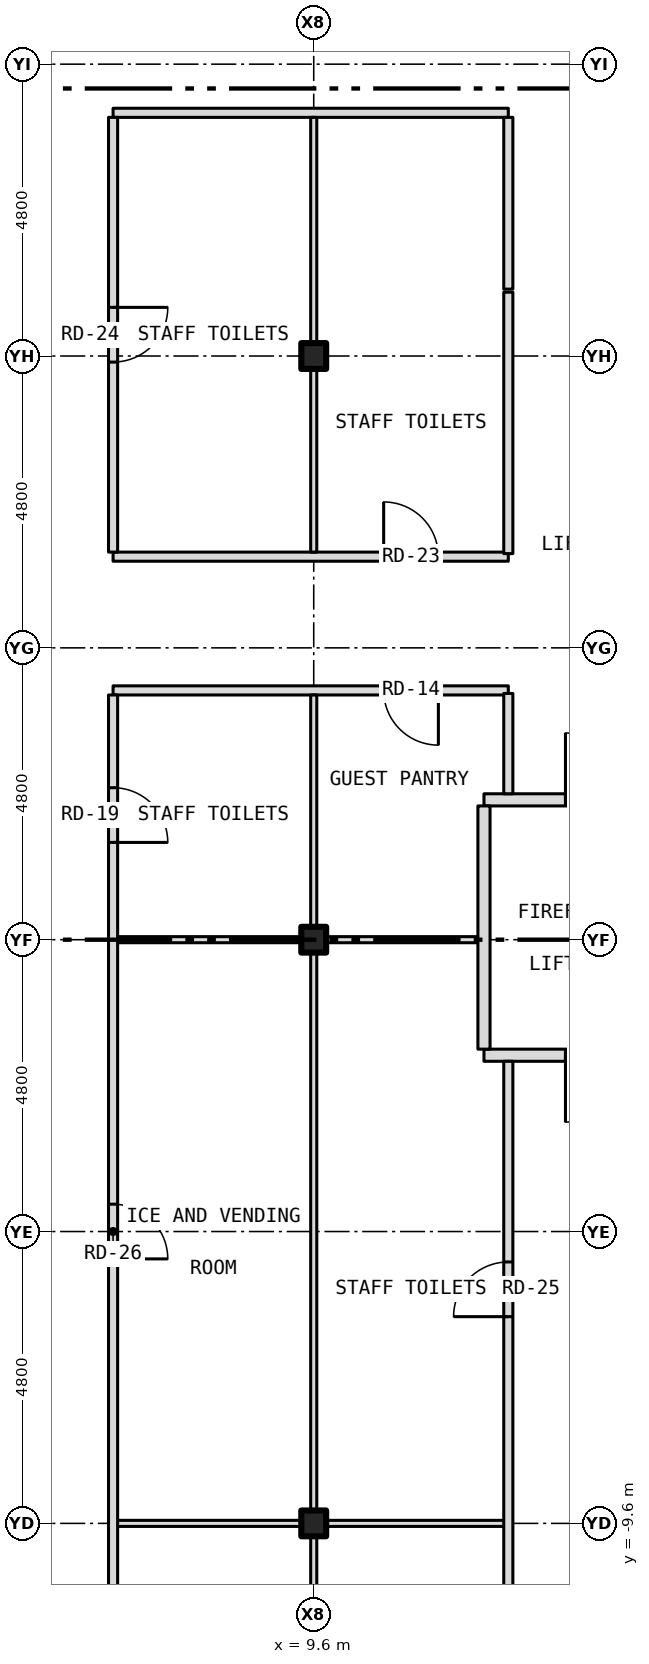
"""IFC4 building model, lengths in metres.
Left out: names, types, materials, properties, quantities, classifications, styles, units other than length and angle.
Written with IfcOpenShell. Run it as: python <this file> out.ifc"""

import sys

from ifc_helpers import new_model, si_unit, direction, frame, frame_2d, origin, origin_2d, place, context, subcontext, project, spatial, rectangle, i_section, extrude, element, fill, save


model = new_model("IFC4")
c1 = context("Model", 3, precision=1e-05, world=origin(), true_north=direction((0.0, 1.0)))
c2 = subcontext(c1, "Body", "Model", "MODEL_VIEW")
j1 = project(units=[si_unit("LENGTHUNIT", "METRE"), si_unit("PLANEANGLEUNIT", "RADIAN")], contexts=[c1])
p1 = place(None, origin())
s1 = spatial("IfcSite", under=j1, at=p1, CompositionType="ELEMENT")
p2 = place(p1, origin())
s2 = spatial("IfcBuilding", under=s1, at=p2, CompositionType="ELEMENT")
p3 = place(p2, frame((0.0, 0.0, 49.5)))
s3 = spatial("IfcBuildingStorey", under=s2, at=p3, CompositionType="ELEMENT", Elevation=49.5)
for number, where, z_axis, x_axis in (
    (1, (9.6, -9.6, -0.15), (0.0, 0.0, 1.0), (1.0, 0.0, 0.0)),
    (2, (9.6, 0.0, -0.15), (0.0, 0.0, 1.0), (1.0, 0.0, 0.0)),
    (3, (9.6, 9.6, -0.15), (0.0, 0.0, 1.0), (1.0, 0.0, 0.0)),
):
    element("IfcColumn", number, at=place(p3, frame(where, z_axis=z_axis, x_axis=x_axis)), inside=s3, PredefinedType="COLUMN", context=c2, shape_type="SweptSolid", body=[
        extrude(i_section(OverallWidth=0.409, OverallDepth=0.424, WebThickness=0.033, FlangeThickness=0.052, at=origin_2d()), origin(), (0.0, 0.0, 1.0), 3.5),
    ])
p4 = place(p3, frame((6.3, -9.6, 0.0), z_axis=(0.0, 0.0, 1.0), x_axis=(1.0, 0.0, 0.0)))
e4 = element("IfcWall", 4, at=p4, inside=s3, PredefinedType="PARTITIONING", context=c2, shape_type="SweptSolid", body=[
    extrude(rectangle(XDim=3.096, YDim=0.1, at=frame_2d((1.548, 0.0))), origin(), (0.0, 0.0, 1.0), 2.728),
])
p5 = place(p3, frame((9.396, -9.6, 0.0), z_axis=(0.0, 0.0, 1.0), x_axis=(1.0, 0.0, 0.0)))
e5 = element("IfcWall", 5, at=p5, inside=s3, PredefinedType="PARTITIONING", context=c2, shape_type="SweptSolid", body=[
    extrude(rectangle(XDim=0.408, YDim=0.1, at=frame_2d((0.204, 0.0))), origin(), (0.0, 0.0, 1.0), 3.35),
])
p6 = place(p3, frame((9.804, -9.6, 0.0), z_axis=(0.0, 0.0, 1.0), x_axis=(1.0, 0.0, 0.0)))
e6 = element("IfcWall", 6, at=p6, inside=s3, PredefinedType="PARTITIONING", context=c2, shape_type="SweptSolid", body=[
    extrude(rectangle(XDim=2.996, YDim=0.1, at=frame_2d((1.498, 0.0))), origin(), (0.0, 0.0, 1.0), 2.728),
])
p7 = place(p3, frame((12.4, -1.9, 0.0), z_axis=(0.0, 0.0, 1.0), x_axis=(1.0, 0.0, 0.0)))
e7 = element("IfcWall", 7, at=p7, inside=s3, PredefinedType="PARTITIONING", context=c2, shape_type="SweptSolid", body=[
    extrude(rectangle(XDim=3.28, YDim=0.2, at=frame_2d((1.64, 0.0))), origin(), (0.0, 0.0, 1.0), 3.35),
])
p8 = place(p7, frame((1.34, 0.0, 0.0)))
e8 = element("IfcOpeningElement", 8, at=p8, cuts=e7, PredefinedType="OPENING", context=c2, shape_type="SweptSolid", body=[
    extrude(rectangle(XDim=1.1, YDim=2.1, at=frame_2d((0.55, 1.05))), frame((0.0, 0.112, 0.0), z_axis=(0.0, -1.0, 0.0), x_axis=(1.0, 0.0, 0.0)), (0.0, 0.0, 1.0), 0.224),
])
p9 = place(p3, frame((6.3, 0.0, 0.0), z_axis=(0.0, 0.0, 1.0), x_axis=(1.0, 0.0, 0.0)))
e9 = element("IfcWall", 9, at=p9, inside=s3, PredefinedType="PARTITIONING", context=c2, shape_type="SweptSolid", body=[
    extrude(rectangle(XDim=3.096, YDim=0.1, at=frame_2d((1.548, 0.0))), origin(), (0.0, 0.0, 1.0), 2.728),
])
p10 = place(p3, frame((9.396, 0.0, 0.0), z_axis=(0.0, 0.0, 1.0), x_axis=(1.0, 0.0, 0.0)))
e10 = element("IfcWall", 10, at=p10, inside=s3, PredefinedType="PARTITIONING", context=c2, shape_type="SweptSolid", body=[
    extrude(rectangle(XDim=0.408, YDim=0.1, at=frame_2d((0.204, 0.0))), origin(), (0.0, 0.0, 1.0), 3.35),
])
p11 = place(p3, frame((9.804, 0.0, 0.0), z_axis=(0.0, 0.0, 1.0), x_axis=(1.0, 0.0, 0.0)))
e11 = element("IfcWall", 11, at=p11, inside=s3, PredefinedType="PARTITIONING", context=c2, shape_type="SweptSolid", body=[
    extrude(rectangle(XDim=2.596, YDim=0.1, at=frame_2d((1.298, 0.0))), origin(), (0.0, 0.0, 1.0), 2.728),
])
p12 = place(p3, frame((12.4, 2.3, 0.0), z_axis=(0.0, 0.0, 1.0), x_axis=(1.0, 0.0, 0.0)))
e12 = element("IfcWall", 12, at=p12, inside=s3, PredefinedType="PARTITIONING", context=c2, shape_type="SweptSolid", body=[
    extrude(rectangle(XDim=3.28, YDim=0.2, at=frame_2d((1.64, 0.0))), origin(), (0.0, 0.0, 1.0), 3.35),
])
p13 = place(p12, frame((1.34, 0.0, 0.0)))
e13 = element("IfcOpeningElement", 13, at=p13, cuts=e12, PredefinedType="OPENING", context=c2, shape_type="SweptSolid", body=[
    extrude(rectangle(XDim=1.1, YDim=2.1, at=frame_2d((0.55, 1.05))), frame((0.0, 0.112, 0.0), z_axis=(0.0, -1.0, 0.0), x_axis=(1.0, 0.0, 0.0)), (0.0, 0.0, 1.0), 0.224),
])
p14 = place(p3, frame((6.3, 4.1, 0.0), z_axis=(0.0, 0.0, 1.0), x_axis=(1.0, 0.0, 0.0)))
e14 = element("IfcWall", 14, at=p14, inside=s3, PredefinedType="PARTITIONING", context=c2, shape_type="SweptSolid", body=[
    extrude(rectangle(XDim=6.5, YDim=0.15, at=frame_2d((3.25, 0.0))), origin(), (0.0, 0.0, 1.0), 3.35),
])
p15 = place(p14, frame((4.45, 0.0, 0.0)))
e15 = element("IfcOpeningElement", 15, at=p15, cuts=e14, PredefinedType="OPENING", context=c2, shape_type="SweptSolid", body=[
    extrude(rectangle(XDim=0.9, YDim=2.1, at=frame_2d((0.45, 1.05))), frame((0.0, 0.087, 0.0), z_axis=(0.0, -1.0, 0.0), x_axis=(1.0, 0.0, 0.0)), (0.0, 0.0, 1.0), 0.174),
])
p16 = place(p3, frame((6.3, 6.3, 0.0), z_axis=(0.0, 0.0, 1.0), x_axis=(1.0, 0.0, 0.0)))
e16 = element("IfcWall", 16, at=p16, inside=s3, PredefinedType="PARTITIONING", context=c2, shape_type="SweptSolid", body=[
    extrude(rectangle(XDim=6.5, YDim=0.15, at=frame_2d((3.25, 0.0))), origin(), (0.0, 0.0, 1.0), 3.35),
])
p17 = place(p16, frame((4.45, 0.0, 0.0)))
e17 = element("IfcOpeningElement", 17, at=p17, cuts=e16, PredefinedType="OPENING", context=c2, shape_type="SweptSolid", body=[
    extrude(rectangle(XDim=0.9, YDim=2.1, at=frame_2d((0.45, 1.05))), frame((0.0, 0.087, 0.0), z_axis=(0.0, -1.0, 0.0), x_axis=(1.0, 0.0, 0.0)), (0.0, 0.0, 1.0), 0.174),
])
p18 = place(p3, frame((6.3, 13.6, 0.0), z_axis=(0.0, 0.0, 1.0), x_axis=(1.0, 0.0, 0.0)))
e18 = element("IfcWall", 18, at=p18, inside=s3, PredefinedType="PARTITIONING", context=c2, shape_type="SweptSolid", body=[
    extrude(rectangle(XDim=6.5, YDim=0.15, at=frame_2d((3.25, 0.0))), origin(), (0.0, 0.0, 1.0), 3.35),
])
p19 = place(p3, frame((6.3, -13.525, 0.0), z_axis=(0.0, 0.0, 1.0), x_axis=(0.0, 1.0, 0.0)))
e19 = element("IfcWall", 19, at=p19, inside=s3, PredefinedType="PARTITIONING", context=c2, shape_type="SweptSolid", body=[
    extrude(rectangle(XDim=17.55, YDim=0.15, at=frame_2d((8.775, 0.0))), origin(), (0.0, 0.0, 1.0), 3.35),
])
p20 = place(p19, frame((1.475, 0.0, 0.0)))
e20 = element("IfcOpeningElement", 20, at=p20, cuts=e19, PredefinedType="OPENING", context=c2, shape_type="SweptSolid", body=[
    extrude(rectangle(XDim=0.9, YDim=2.1, at=frame_2d((0.45, 1.05))), frame((0.0, 0.087, 0.0), z_axis=(0.0, -1.0, 0.0), x_axis=(1.0, 0.0, 0.0)), (0.0, 0.0, 1.0), 0.174),
])
p21 = place(p19, frame((15.125, 0.0, 0.0)))
e21 = element("IfcOpeningElement", 21, at=p21, cuts=e19, PredefinedType="OPENING", context=c2, shape_type="SweptSolid", body=[
    extrude(rectangle(XDim=0.9, YDim=2.1, at=frame_2d((0.45, 1.05))), frame((0.0, 0.087, 0.0), z_axis=(0.0, -1.0, 0.0), x_axis=(1.0, 0.0, 0.0)), (0.0, 0.0, 1.0), 0.174),
])
p22 = place(p19, frame((8.275, 0.0, 0.0)))
e22 = element("IfcOpeningElement", 22, at=p22, cuts=e19, PredefinedType="OPENING", context=c2, shape_type="SweptSolid", body=[
    extrude(rectangle(XDim=0.9, YDim=2.1, at=frame_2d((0.45, 1.05))), frame((0.0, 0.087, 0.0), z_axis=(0.0, -1.0, 0.0), x_axis=(1.0, 0.0, 0.0)), (0.0, 0.0, 1.0), 0.174),
])
p23 = place(p3, frame((6.3, 6.375, 0.0), z_axis=(0.0, 0.0, 1.0), x_axis=(0.0, 1.0, 0.0)))
e23 = element("IfcWall", 23, at=p23, inside=s3, PredefinedType="PARTITIONING", context=c2, shape_type="SweptSolid", body=[
    extrude(rectangle(XDim=7.15, YDim=0.15, at=frame_2d((3.575, 0.0))), origin(), (0.0, 0.0, 1.0), 3.35),
])
p24 = place(p23, frame((3.125, 0.0, 0.0)))
e24 = element("IfcOpeningElement", 24, at=p24, cuts=e23, PredefinedType="OPENING", context=c2, shape_type="SweptSolid", body=[
    extrude(rectangle(XDim=0.9, YDim=2.1, at=frame_2d((0.45, 1.05))), frame((0.0, 0.087, 0.0), z_axis=(0.0, -1.0, 0.0), x_axis=(1.0, 0.0, 0.0)), (0.0, 0.0, 1.0), 0.174),
])
p25 = place(p3, frame((9.6, -13.525, 0.0), z_axis=(0.0, 0.0, 1.0), x_axis=(0.0, 1.0, 0.0)))
e25 = element("IfcWall", 25, at=p25, inside=s3, PredefinedType="PARTITIONING", context=c2, shape_type="SweptSolid", body=[
    extrude(rectangle(XDim=3.875, YDim=0.1, at=frame_2d((1.938, 0.0))), origin(), (0.0, 0.0, 1.0), 2.728),
])
p26 = place(p3, frame((9.6, -9.55, 0.0), z_axis=(0.0, 0.0, 1.0), x_axis=(0.0, 1.0, 0.0)))
e26 = element("IfcWall", 26, at=p26, inside=s3, PredefinedType="PARTITIONING", context=c2, shape_type="SweptSolid", body=[
    extrude(rectangle(XDim=9.5, YDim=0.1, at=frame_2d((4.75, 0.0))), origin(), (0.0, 0.0, 1.0), 2.728),
])
p27 = place(p3, frame((9.6, 0.05, 0.0), z_axis=(0.0, 0.0, 1.0), x_axis=(0.0, 1.0, 0.0)))
e27 = element("IfcWall", 27, at=p27, inside=s3, PredefinedType="PARTITIONING", context=c2, shape_type="SweptSolid", body=[
    extrude(rectangle(XDim=3.975, YDim=0.1, at=frame_2d((1.987, 0.0))), origin(), (0.0, 0.0, 1.0), 2.728),
])
p28 = place(p3, frame((9.6, 6.375, 0.0), z_axis=(0.0, 0.0, 1.0), x_axis=(0.0, 1.0, 0.0)))
e28 = element("IfcWall", 28, at=p28, inside=s3, PredefinedType="PARTITIONING", context=c2, shape_type="SweptSolid", body=[
    extrude(rectangle(XDim=3.021, YDim=0.1, at=frame_2d((1.51, 0.0))), origin(), (0.0, 0.0, 1.0), 2.728),
])
p29 = place(p3, frame((9.6, 9.396, 0.0), z_axis=(0.0, 0.0, 1.0), x_axis=(0.0, 1.0, 0.0)))
e29 = element("IfcWall", 29, at=p29, inside=s3, PredefinedType="PARTITIONING", context=c2, shape_type="SweptSolid", body=[
    extrude(rectangle(XDim=0.408, YDim=0.1, at=frame_2d((0.204, 0.0))), origin(), (0.0, 0.0, 1.0), 3.35),
])
p30 = place(p3, frame((9.6, 9.804, 0.0), z_axis=(0.0, 0.0, 1.0), x_axis=(0.0, 1.0, 0.0)))
e30 = element("IfcWall", 30, at=p30, inside=s3, PredefinedType="PARTITIONING", context=c2, shape_type="SweptSolid", body=[
    extrude(rectangle(XDim=3.721, YDim=0.1, at=frame_2d((1.86, 0.0))), origin(), (0.0, 0.0, 1.0), 2.728),
])
p31 = place(p3, frame((12.4, -1.8, 0.0), z_axis=(0.0, 0.0, 1.0), x_axis=(0.0, 1.0, 0.0)))
e31 = element("IfcWall", 31, at=p31, inside=s3, PredefinedType="PARTITIONING", context=c2, shape_type="SweptSolid", body=[
    extrude(rectangle(XDim=4.0, YDim=0.2, at=frame_2d((2.0, 0.0))), origin(), (0.0, 0.0, 1.0), 3.35),
])
p32 = place(p3, frame((12.8, -13.525, 0.0), z_axis=(0.0, 0.0, 1.0), x_axis=(0.0, 1.0, 0.0)))
e32 = element("IfcWall", 32, at=p32, inside=s3, PredefinedType="PARTITIONING", context=c2, shape_type="SweptSolid", body=[
    extrude(rectangle(XDim=11.525, YDim=0.15, at=frame_2d((5.762, 0.0))), origin(), (0.0, 0.0, 1.0), 3.35),
])
p33 = place(p32, frame((7.325, 0.0, 0.0)))
e33 = element("IfcOpeningElement", 33, at=p33, cuts=e32, PredefinedType="OPENING", context=c2, shape_type="SweptSolid", body=[
    extrude(rectangle(XDim=0.9, YDim=2.1, at=frame_2d((0.45, 1.05))), frame((0.0, 0.087, 0.0), z_axis=(0.0, -1.0, 0.0), x_axis=(1.0, 0.0, 0.0)), (0.0, 0.0, 1.0), 0.174),
])
p34 = place(p3, frame((12.8, 2.4, 0.0), z_axis=(0.0, 0.0, 1.0), x_axis=(0.0, 1.0, 0.0)))
e34 = element("IfcWall", 34, at=p34, inside=s3, PredefinedType="PARTITIONING", context=c2, shape_type="SweptSolid", body=[
    extrude(rectangle(XDim=1.65, YDim=0.15, at=frame_2d((0.825, 0.0))), origin(), (0.0, 0.0, 1.0), 3.35),
])
p35 = place(p3, frame((12.8, 6.35, 0.0), z_axis=(0.0, 0.0, 1.0), x_axis=(0.0, 1.0, 0.0)))
e35 = element("IfcWall", 35, at=p35, inside=s3, PredefinedType="PARTITIONING", context=c2, shape_type="SweptSolid", body=[
    extrude(rectangle(XDim=4.3, YDim=0.15, at=frame_2d((2.15, 0.0))), origin(), (0.0, 0.0, 1.0), 3.35),
])
p36 = place(p3, frame((12.8, 10.7, 0.0), z_axis=(0.0, 0.0, 1.0), x_axis=(0.0, 1.0, 0.0)))
e36 = element("IfcWall", 36, at=p36, inside=s3, PredefinedType="PARTITIONING", context=c2, shape_type="SweptSolid", body=[
    extrude(rectangle(XDim=2.825, YDim=0.15, at=frame_2d((1.413, 0.0))), origin(), (0.0, 0.0, 1.0), 3.35),
])
p37 = place(p13, origin())
e37 = element("IfcDoor", 37, at=p37, inside=s3, OperationType="SINGLE_SWING_LEFT", PredefinedType="DOOR", context=c2, shape_type="SweptSolid", body=[
    extrude(rectangle(XDim=1.1, YDim=2.1, at=frame_2d((0.55, 1.05))), frame((0.0, 0.025, 0.0), z_axis=(0.0, -1.0, 0.0), x_axis=(1.0, 0.0, 0.0)), (0.0, 0.0, 1.0), 0.05),
])
fill(e13, e37)
p38 = place(p8, origin())
e38 = element("IfcDoor", 38, at=p38, inside=s3, OperationType="SINGLE_SWING_LEFT", PredefinedType="DOOR", context=c2, shape_type="SweptSolid", body=[
    extrude(rectangle(XDim=1.1, YDim=2.1, at=frame_2d((0.55, 1.05))), frame((0.0, 0.025, 0.0), z_axis=(0.0, -1.0, 0.0), x_axis=(1.0, 0.0, 0.0)), (0.0, 0.0, 1.0), 0.05),
])
fill(e8, e38)
p39 = place(p15, origin())
e39 = element("IfcDoor", 39, at=p39, inside=s3, OperationType="SINGLE_SWING_RIGHT", PredefinedType="DOOR", context=c2, shape_type="SweptSolid", body=[
    extrude(rectangle(XDim=0.9, YDim=2.1, at=frame_2d((0.45, 1.05))), frame((0.0, 0.025, 0.0), z_axis=(0.0, -1.0, 0.0), x_axis=(1.0, 0.0, 0.0)), (0.0, 0.0, 1.0), 0.05),
])
fill(e15, e39)
p40 = place(p21, origin())
e40 = element("IfcDoor", 40, at=p40, inside=s3, OperationType="SINGLE_SWING_LEFT", PredefinedType="DOOR", context=c2, shape_type="SweptSolid", body=[
    extrude(rectangle(XDim=0.9, YDim=2.1, at=frame_2d((0.45, 1.05))), frame((0.0, 0.025, 0.0), z_axis=(0.0, -1.0, 0.0), x_axis=(1.0, 0.0, 0.0)), (0.0, 0.0, 1.0), 0.05),
])
fill(e21, e40)
p41 = place(p17, origin())
e41 = element("IfcDoor", 41, at=p41, inside=s3, OperationType="SINGLE_SWING_LEFT", PredefinedType="DOOR", context=c2, shape_type="SweptSolid", body=[
    extrude(rectangle(XDim=0.9, YDim=2.1, at=frame_2d((0.45, 1.05))), frame((0.0, 0.025, 0.0), z_axis=(0.0, -1.0, 0.0), x_axis=(1.0, 0.0, 0.0)), (0.0, 0.0, 1.0), 0.05),
])
fill(e17, e41)
p42 = place(p24, origin())
e42 = element("IfcDoor", 42, at=p42, inside=s3, OperationType="SINGLE_SWING_RIGHT", PredefinedType="DOOR", context=c2, shape_type="SweptSolid", body=[
    extrude(rectangle(XDim=0.9, YDim=2.1, at=frame_2d((0.45, 1.05))), frame((0.0, 0.025, 0.0), z_axis=(0.0, -1.0, 0.0), x_axis=(1.0, 0.0, 0.0)), (0.0, 0.0, 1.0), 0.05),
])
fill(e24, e42)
p43 = place(p33, origin())
e43 = element("IfcDoor", 43, at=p43, inside=s3, OperationType="SINGLE_SWING_LEFT", PredefinedType="DOOR", context=c2, shape_type="SweptSolid", body=[
    extrude(rectangle(XDim=0.9, YDim=2.1, at=frame_2d((0.45, 1.05))), frame((0.0, 0.025, 0.0), z_axis=(0.0, -1.0, 0.0), x_axis=(1.0, 0.0, 0.0)), (0.0, 0.0, 1.0), 0.05),
])
fill(e33, e43)
p44 = place(p22, origin())
e44 = element("IfcDoor", 44, at=p44, inside=s3, OperationType="SINGLE_SWING_LEFT", PredefinedType="DOOR", context=c2, shape_type="SweptSolid", body=[
    extrude(rectangle(XDim=0.9, YDim=2.1, at=frame_2d((0.45, 1.05))), frame((0.0, 0.025, 0.0), z_axis=(0.0, -1.0, 0.0), x_axis=(1.0, 0.0, 0.0)), (0.0, 0.0, 1.0), 0.05),
])
fill(e22, e44)
save(model, sys.argv[1])
